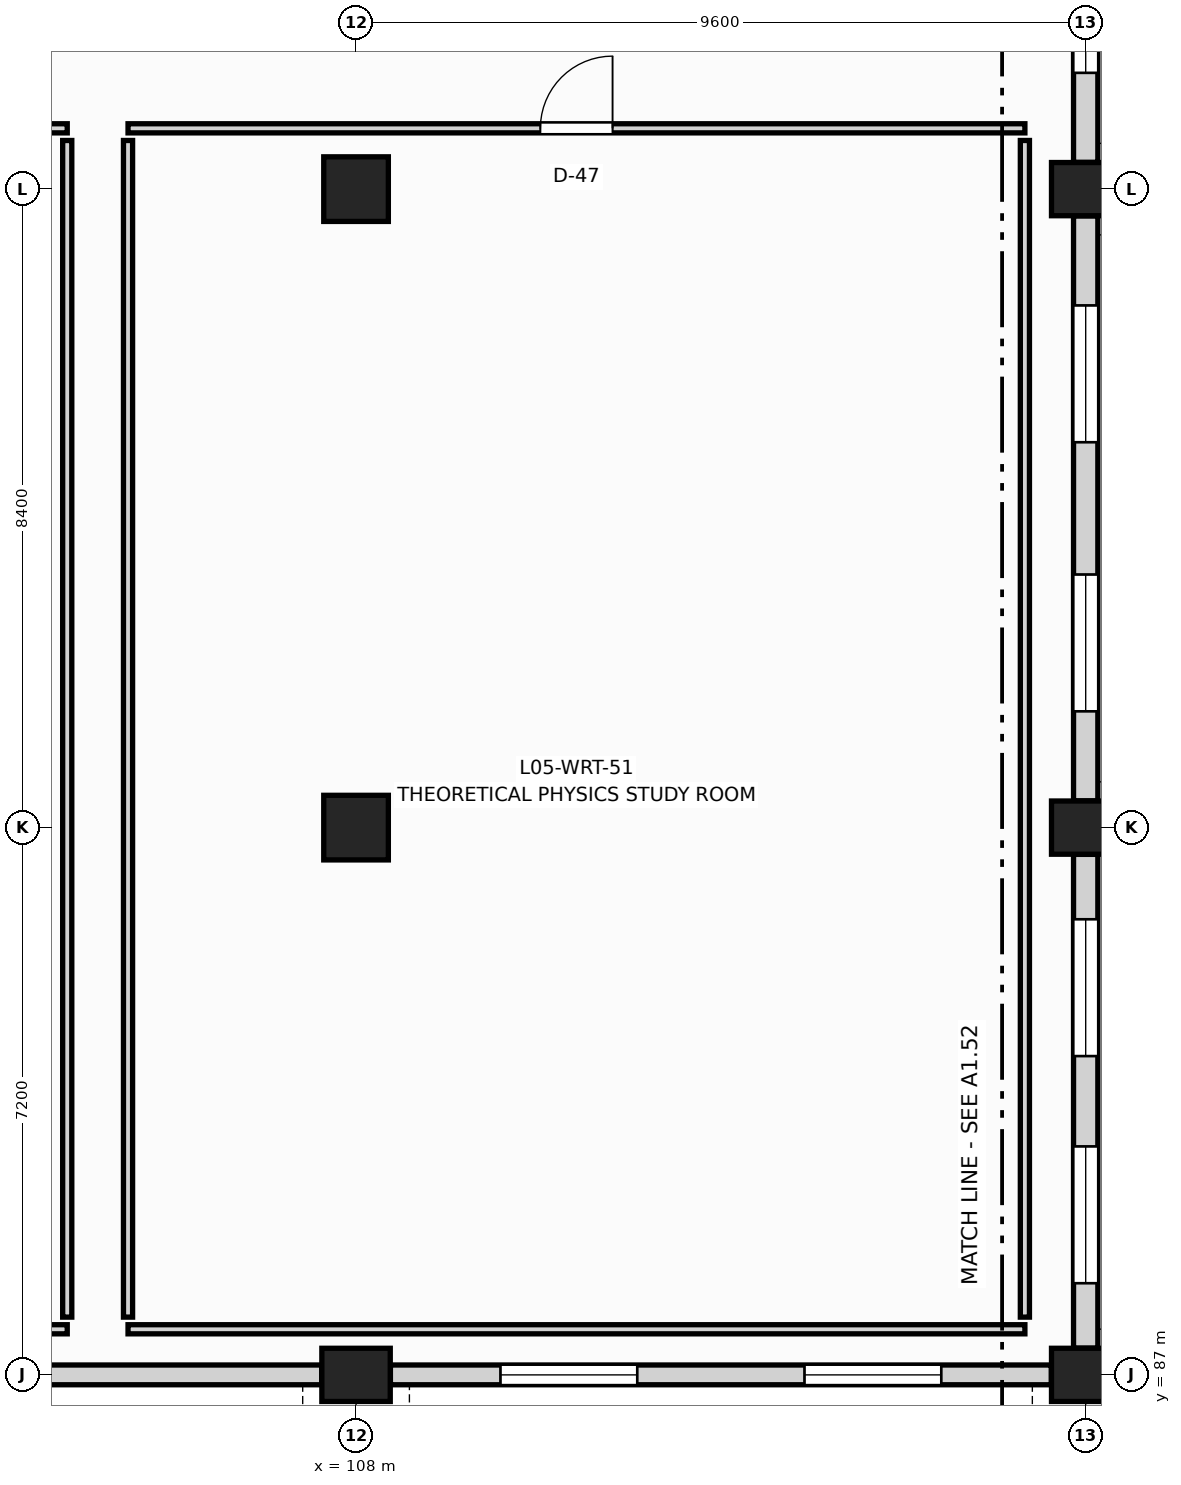
"""IFC4 building model, lengths in metres.
Left out: names, types, materials, properties, quantities, classifications, styles, units other than length and angle.
Written with IfcOpenShell. Run it as: python <this file> out.ifc"""

import sys

from ifc_helpers import new_model, si_unit, direction, frame, frame_2d, origin, origin_2d, place, context, subcontext, project, spatial, rectangle, extrude, element, fill, save


model = new_model("IFC4")
c1 = context("Model", 3, precision=1e-05, world=origin(), true_north=direction((0.0, 1.0)))
c2 = subcontext(c1, "Body", "Model", "MODEL_VIEW")
j1 = project(units=[si_unit("LENGTHUNIT", "METRE"), si_unit("PLANEANGLEUNIT", "RADIAN")], contexts=[c1])
p1 = place(None, origin())
s1 = spatial("IfcSite", under=j1, at=p1, CompositionType="ELEMENT")
p2 = place(p1, origin())
s2 = spatial("IfcBuilding", under=s1, at=p2, CompositionType="ELEMENT")
p3 = place(p2, frame((0.0, 0.0, 22.5)))
s3 = spatial("IfcBuildingStorey", under=s2, at=p3, CompositionType="ELEMENT", Elevation=22.5)
p4 = place(p3, frame((108.0, 87.0, 0.0), z_axis=(0.0, 0.0, 1.0), x_axis=(1.0, 0.0, 0.0)))
e1 = element("IfcColumn", 1, at=p4, inside=s3, PredefinedType="COLUMN", context=c2, shape_type="SweptSolid", body=[
    extrude(rectangle(XDim=0.9, YDim=0.7, at=origin_2d()), origin(), (0.0, 0.0, 1.0), 3.96),
])
for number, where, z_axis, x_axis in (
    (2, (108.0, 94.2, 0.0), (0.0, 0.0, 1.0), (1.0, 0.0, 0.0)),
    (3, (108.0, 102.6, 0.0), (0.0, 0.0, 1.0), (1.0, 0.0, 0.0)),
):
    element("IfcColumn", number, at=place(p3, frame(where, z_axis=z_axis, x_axis=x_axis)), inside=s3, PredefinedType="COLUMN", context=c2, shape_type="SweptSolid", body=[
        extrude(rectangle(XDim=0.85, YDim=0.85, at=origin_2d()), origin(), (0.0, 0.0, 1.0), 3.92),
    ])
p5 = place(p3, frame((117.6, 87.0, 0.0), z_axis=(0.0, 0.0, 1.0), x_axis=(1.0, 0.0, 0.0)))
e4 = element("IfcColumn", 4, at=p5, inside=s3, PredefinedType="COLUMN", context=c2, shape_type="SweptSolid", body=[
    extrude(rectangle(XDim=0.9, YDim=0.7, at=origin_2d()), origin(), (0.0, 0.0, 1.0), 3.98),
])
for number, where, z_axis, x_axis in (
    (5, (117.6, 94.2, 0.0), (0.0, 0.0, 1.0), (1.0, 0.0, 0.0)),
    (6, (117.6, 102.6, 0.0), (0.0, 0.0, 1.0), (1.0, 0.0, 0.0)),
):
    element("IfcColumn", number, at=place(p3, frame(where, z_axis=z_axis, x_axis=x_axis)), inside=s3, PredefinedType="COLUMN", context=c2, shape_type="SweptSolid", body=[
        extrude(rectangle(XDim=0.9, YDim=0.7, at=origin_2d()), origin(), (0.0, 0.0, 1.0), 3.92),
    ])
p6 = place(p3, frame((117.6, 87.352, 0.0), z_axis=(0.0, 0.0, 1.0), x_axis=(0.0, 1.0, 0.0)))
e7 = element("IfcWall", 7, at=p6, inside=s3, PredefinedType="SOLIDWALL", context=c2, shape_type="SweptSolid", body=[
    extrude(rectangle(XDim=6.496, YDim=0.32, at=frame_2d((3.248, 0.0))), origin(), (0.0, 0.0, 1.0), 3.08),
])
p7 = place(p6, frame((0.854, 0.0, 0.85)))
e8 = element("IfcOpeningElement", 8, at=p7, cuts=e7, PredefinedType="OPENING", context=c2, shape_type="SweptSolid", body=[
    extrude(rectangle(XDim=1.8, YDim=1.9, at=frame_2d((0.9, 0.95))), frame((0.0, 0.17, 0.0), z_axis=(0.0, -1.0, 0.0), x_axis=(1.0, 0.0, 0.0)), (0.0, 0.0, 1.0), 0.34),
])
p8 = place(p6, frame((3.842, 0.0, 0.85)))
e9 = element("IfcOpeningElement", 9, at=p8, cuts=e7, PredefinedType="OPENING", context=c2, shape_type="SweptSolid", body=[
    extrude(rectangle(XDim=1.8, YDim=1.9, at=frame_2d((0.9, 0.95))), frame((0.0, 0.17, 0.0), z_axis=(0.0, -1.0, 0.0), x_axis=(1.0, 0.0, 0.0)), (0.0, 0.0, 1.0), 0.34),
])
p9 = place(p3, frame((117.6, 94.552, 0.0), z_axis=(0.0, 0.0, 1.0), x_axis=(0.0, 1.0, 0.0)))
e10 = element("IfcWall", 10, at=p9, inside=s3, PredefinedType="SOLIDWALL", context=c2, shape_type="SweptSolid", body=[
    extrude(rectangle(XDim=7.696, YDim=0.32, at=frame_2d((3.848, 0.0))), origin(), (0.0, 0.0, 1.0), 3.08),
])
p10 = place(p9, frame((1.178, 0.0, 0.85)))
e11 = element("IfcOpeningElement", 11, at=p10, cuts=e10, PredefinedType="OPENING", context=c2, shape_type="SweptSolid", body=[
    extrude(rectangle(XDim=1.8, YDim=1.9, at=frame_2d((0.9, 0.95))), frame((0.0, 0.17, 0.0), z_axis=(0.0, -1.0, 0.0), x_axis=(1.0, 0.0, 0.0)), (0.0, 0.0, 1.0), 0.34),
])
p11 = place(p9, frame((4.718, 0.0, 0.85)))
e12 = element("IfcOpeningElement", 12, at=p11, cuts=e10, PredefinedType="OPENING", context=c2, shape_type="SweptSolid", body=[
    extrude(rectangle(XDim=1.8, YDim=1.9, at=frame_2d((0.9, 0.95))), frame((0.0, 0.17, 0.0), z_axis=(0.0, -1.0, 0.0), x_axis=(1.0, 0.0, 0.0)), (0.0, 0.0, 1.0), 0.34),
])
p12 = place(p3, frame((117.6, 102.952, 0.0), z_axis=(0.0, 0.0, 1.0), x_axis=(0.0, 1.0, 0.0)))
e13 = element("IfcWall", 13, at=p12, inside=s3, PredefinedType="SOLIDWALL", context=c2, shape_type="SweptSolid", body=[
    extrude(rectangle(XDim=7.696, YDim=0.32, at=frame_2d((3.848, 0.0))), origin(), (0.0, 0.0, 1.0), 3.08),
])
p13 = place(p12, frame((1.178, 0.0, 0.85)))
e14 = element("IfcOpeningElement", 14, at=p13, cuts=e13, PredefinedType="OPENING", context=c2, shape_type="SweptSolid", body=[
    extrude(rectangle(XDim=1.8, YDim=1.9, at=frame_2d((0.9, 0.95))), frame((0.0, 0.17, 0.0), z_axis=(0.0, -1.0, 0.0), x_axis=(1.0, 0.0, 0.0)), (0.0, 0.0, 1.0), 0.34),
])
p14 = place(p12, frame((4.718, 0.0, 0.85)))
e15 = element("IfcOpeningElement", 15, at=p14, cuts=e13, PredefinedType="OPENING", context=c2, shape_type="SweptSolid", body=[
    extrude(rectangle(XDim=1.8, YDim=1.9, at=frame_2d((0.9, 0.95))), frame((0.0, 0.17, 0.0), z_axis=(0.0, -1.0, 0.0), x_axis=(1.0, 0.0, 0.0)), (0.0, 0.0, 1.0), 0.34),
])
p15 = place(p3, frame((98.852, 87.0, 0.0), z_axis=(0.0, 0.0, 1.0), x_axis=(1.0, 0.0, 0.0)))
e16 = element("IfcWall", 16, at=p15, inside=s3, PredefinedType="SOLIDWALL", context=c2, shape_type="SweptSolid", body=[
    extrude(rectangle(XDim=8.696, YDim=0.26, at=frame_2d((4.348, 0.0))), origin(), (0.0, 0.0, 1.0), 3.08),
])
p16 = place(p15, frame((1.448, 0.0, 0.85)))
e17 = element("IfcOpeningElement", 17, at=p16, cuts=e16, PredefinedType="OPENING", context=c2, shape_type="SweptSolid", body=[
    extrude(rectangle(XDim=1.8, YDim=1.9, at=frame_2d((0.9, 0.95))), frame((0.0, 0.14, 0.0), z_axis=(0.0, -1.0, 0.0), x_axis=(1.0, 0.0, 0.0)), (0.0, 0.0, 1.0), 0.28),
])
p17 = place(p3, frame((108.452, 87.0, 0.0), z_axis=(0.0, 0.0, 1.0), x_axis=(1.0, 0.0, 0.0)))
e18 = element("IfcWall", 18, at=p17, inside=s3, PredefinedType="SOLIDWALL", context=c2, shape_type="SweptSolid", body=[
    extrude(rectangle(XDim=8.696, YDim=0.26, at=frame_2d((4.348, 0.0))), origin(), (0.0, 0.0, 1.0), 3.08),
])
p18 = place(p17, frame((1.448, 0.0, 0.85)))
e19 = element("IfcOpeningElement", 19, at=p18, cuts=e18, PredefinedType="OPENING", context=c2, shape_type="SweptSolid", body=[
    extrude(rectangle(XDim=1.8, YDim=1.9, at=frame_2d((0.9, 0.95))), frame((0.0, 0.14, 0.0), z_axis=(0.0, -1.0, 0.0), x_axis=(1.0, 0.0, 0.0)), (0.0, 0.0, 1.0), 0.28),
])
p19 = place(p17, frame((5.448, 0.0, 0.85)))
e20 = element("IfcOpeningElement", 20, at=p19, cuts=e18, PredefinedType="OPENING", context=c2, shape_type="SweptSolid", body=[
    extrude(rectangle(XDim=1.8, YDim=1.9, at=frame_2d((0.9, 0.95))), frame((0.0, 0.14, 0.0), z_axis=(0.0, -1.0, 0.0), x_axis=(1.0, 0.0, 0.0)), (0.0, 0.0, 1.0), 0.28),
])
p20 = place(p3, frame((85.6, 87.6, 0.0), z_axis=(0.0, 0.0, 1.0), x_axis=(1.0, 0.0, 0.0)))
e21 = element("IfcWall", 21, at=p20, inside=s3, PredefinedType="PARTITIONING", context=c2, shape_type="SweptSolid", body=[
    extrude(rectangle(XDim=18.6, YDim=0.12, at=frame_2d((9.3, 0.0))), origin(), (0.0, 0.0, 1.0), 3.15),
])
p21 = place(p3, frame((85.6, 103.4, 0.0), z_axis=(0.0, 0.0, 1.0), x_axis=(1.0, 0.0, 0.0)))
e22 = element("IfcWall", 22, at=p21, inside=s3, PredefinedType="PARTITIONING", context=c2, shape_type="SweptSolid", body=[
    extrude(rectangle(XDim=18.6, YDim=0.12, at=frame_2d((9.3, 0.0))), origin(), (0.0, 0.0, 1.0), 3.15),
])
p22 = place(p21, frame((8.825, 0.0, 0.0)))
e23 = element("IfcOpeningElement", 23, at=p22, cuts=e22, PredefinedType="OPENING", context=c2, shape_type="SweptSolid", body=[
    extrude(rectangle(XDim=0.95, YDim=2.15, at=frame_2d((0.475, 1.075))), frame((0.0, 0.07, 0.0), z_axis=(0.0, -1.0, 0.0), x_axis=(1.0, 0.0, 0.0)), (0.0, 0.0, 1.0), 0.14),
])
p23 = place(p3, frame((104.2, 87.76, 0.0), z_axis=(0.0, 0.0, 1.0), x_axis=(0.0, 1.0, 0.0)))
e24 = element("IfcWall", 24, at=p23, inside=s3, PredefinedType="PARTITIONING", context=c2, shape_type="SweptSolid", body=[
    extrude(rectangle(XDim=15.48, YDim=0.12, at=frame_2d((7.74, 0.0))), origin(), (0.0, 0.0, 1.0), 3.15),
])
p24 = place(p3, frame((105.0, 87.6, 0.0), z_axis=(0.0, 0.0, 1.0), x_axis=(1.0, 0.0, 0.0)))
e25 = element("IfcWall", 25, at=p24, inside=s3, PredefinedType="PARTITIONING", context=c2, shape_type="SweptSolid", body=[
    extrude(rectangle(XDim=11.8, YDim=0.12, at=frame_2d((5.9, 0.0))), origin(), (0.0, 0.0, 1.0), 3.15),
])
p25 = place(p3, frame((105.0, 103.4, 0.0), z_axis=(0.0, 0.0, 1.0), x_axis=(1.0, 0.0, 0.0)))
e26 = element("IfcWall", 26, at=p25, inside=s3, PredefinedType="PARTITIONING", context=c2, shape_type="SweptSolid", body=[
    extrude(rectangle(XDim=11.8, YDim=0.12, at=frame_2d((5.9, 0.0))), origin(), (0.0, 0.0, 1.0), 3.15),
])
p26 = place(p25, frame((5.425, 0.0, 0.0)))
e27 = element("IfcOpeningElement", 27, at=p26, cuts=e26, PredefinedType="OPENING", context=c2, shape_type="SweptSolid", body=[
    extrude(rectangle(XDim=0.95, YDim=2.15, at=frame_2d((0.475, 1.075))), frame((0.0, 0.07, 0.0), z_axis=(0.0, -1.0, 0.0), x_axis=(1.0, 0.0, 0.0)), (0.0, 0.0, 1.0), 0.14),
])
for number, where, z_axis, x_axis in (
    (28, (105.0, 87.76, 0.0), (0.0, 0.0, 1.0), (0.0, 1.0, 0.0)),
    (29, (116.8, 87.76, 0.0), (0.0, 0.0, 1.0), (0.0, 1.0, 0.0)),
):
    element("IfcWall", number, at=place(p3, frame(where, z_axis=z_axis, x_axis=x_axis)), inside=s3, PredefinedType="PARTITIONING", context=c2, shape_type="SweptSolid", body=[
        extrude(rectangle(XDim=15.48, YDim=0.12, at=frame_2d((7.74, 0.0))), origin(), (0.0, 0.0, 1.0), 3.15),
    ])
p27 = place(p7, origin())
e30 = element("IfcWindow", 30, at=p27, inside=s3, PartitioningType="SINGLE_PANEL", PredefinedType="WINDOW", context=c2, shape_type="SweptSolid", body=[
    extrude(rectangle(XDim=1.8, YDim=1.9, at=frame_2d((0.9, 0.95))), frame((0.0, 0.03, 0.0), z_axis=(0.0, -1.0, 0.0), x_axis=(1.0, 0.0, 0.0)), (0.0, 0.0, 1.0), 0.06),
])
fill(e8, e30)
p28 = place(p8, origin())
e31 = element("IfcWindow", 31, at=p28, inside=s3, PartitioningType="SINGLE_PANEL", PredefinedType="WINDOW", context=c2, shape_type="SweptSolid", body=[
    extrude(rectangle(XDim=1.8, YDim=1.9, at=frame_2d((0.9, 0.95))), frame((0.0, 0.03, 0.0), z_axis=(0.0, -1.0, 0.0), x_axis=(1.0, 0.0, 0.0)), (0.0, 0.0, 1.0), 0.06),
])
fill(e9, e31)
p29 = place(p10, origin())
e32 = element("IfcWindow", 32, at=p29, inside=s3, PartitioningType="SINGLE_PANEL", PredefinedType="WINDOW", context=c2, shape_type="SweptSolid", body=[
    extrude(rectangle(XDim=1.8, YDim=1.9, at=frame_2d((0.9, 0.95))), frame((0.0, 0.03, 0.0), z_axis=(0.0, -1.0, 0.0), x_axis=(1.0, 0.0, 0.0)), (0.0, 0.0, 1.0), 0.06),
])
fill(e11, e32)
p30 = place(p11, origin())
e33 = element("IfcWindow", 33, at=p30, inside=s3, PartitioningType="SINGLE_PANEL", PredefinedType="WINDOW", context=c2, shape_type="SweptSolid", body=[
    extrude(rectangle(XDim=1.8, YDim=1.9, at=frame_2d((0.9, 0.95))), frame((0.0, 0.03, 0.0), z_axis=(0.0, -1.0, 0.0), x_axis=(1.0, 0.0, 0.0)), (0.0, 0.0, 1.0), 0.06),
])
fill(e12, e33)
p31 = place(p13, origin())
e34 = element("IfcWindow", 34, at=p31, inside=s3, PartitioningType="SINGLE_PANEL", PredefinedType="WINDOW", context=c2, shape_type="SweptSolid", body=[
    extrude(rectangle(XDim=1.8, YDim=1.9, at=frame_2d((0.9, 0.95))), frame((0.0, 0.03, 0.0), z_axis=(0.0, -1.0, 0.0), x_axis=(1.0, 0.0, 0.0)), (0.0, 0.0, 1.0), 0.06),
])
fill(e14, e34)
p32 = place(p18, origin())
e35 = element("IfcWindow", 35, at=p32, inside=s3, PartitioningType="SINGLE_PANEL", PredefinedType="WINDOW", context=c2, shape_type="SweptSolid", body=[
    extrude(rectangle(XDim=1.8, YDim=1.9, at=frame_2d((0.9, 0.95))), frame((0.0, 0.03, 0.0), z_axis=(0.0, -1.0, 0.0), x_axis=(1.0, 0.0, 0.0)), (0.0, 0.0, 1.0), 0.06),
])
fill(e19, e35)
p33 = place(p19, origin())
e36 = element("IfcWindow", 36, at=p33, inside=s3, PartitioningType="SINGLE_PANEL", PredefinedType="WINDOW", context=c2, shape_type="SweptSolid", body=[
    extrude(rectangle(XDim=1.8, YDim=1.9, at=frame_2d((0.9, 0.95))), frame((0.0, 0.03, 0.0), z_axis=(0.0, -1.0, 0.0), x_axis=(1.0, 0.0, 0.0)), (0.0, 0.0, 1.0), 0.06),
])
fill(e20, e36)
p34 = place(p26, origin())
e37 = element("IfcDoor", 37, at=p34, inside=s3, OperationType="SINGLE_SWING_RIGHT", PredefinedType="DOOR", context=c2, shape_type="SweptSolid", body=[
    extrude(rectangle(XDim=0.95, YDim=2.15, at=frame_2d((0.475, 1.075))), frame((0.0, 0.025, 0.0), z_axis=(0.0, -1.0, 0.0), x_axis=(1.0, 0.0, 0.0)), (0.0, 0.0, 1.0), 0.05),
])
fill(e27, e37)
save(model, sys.argv[1])
